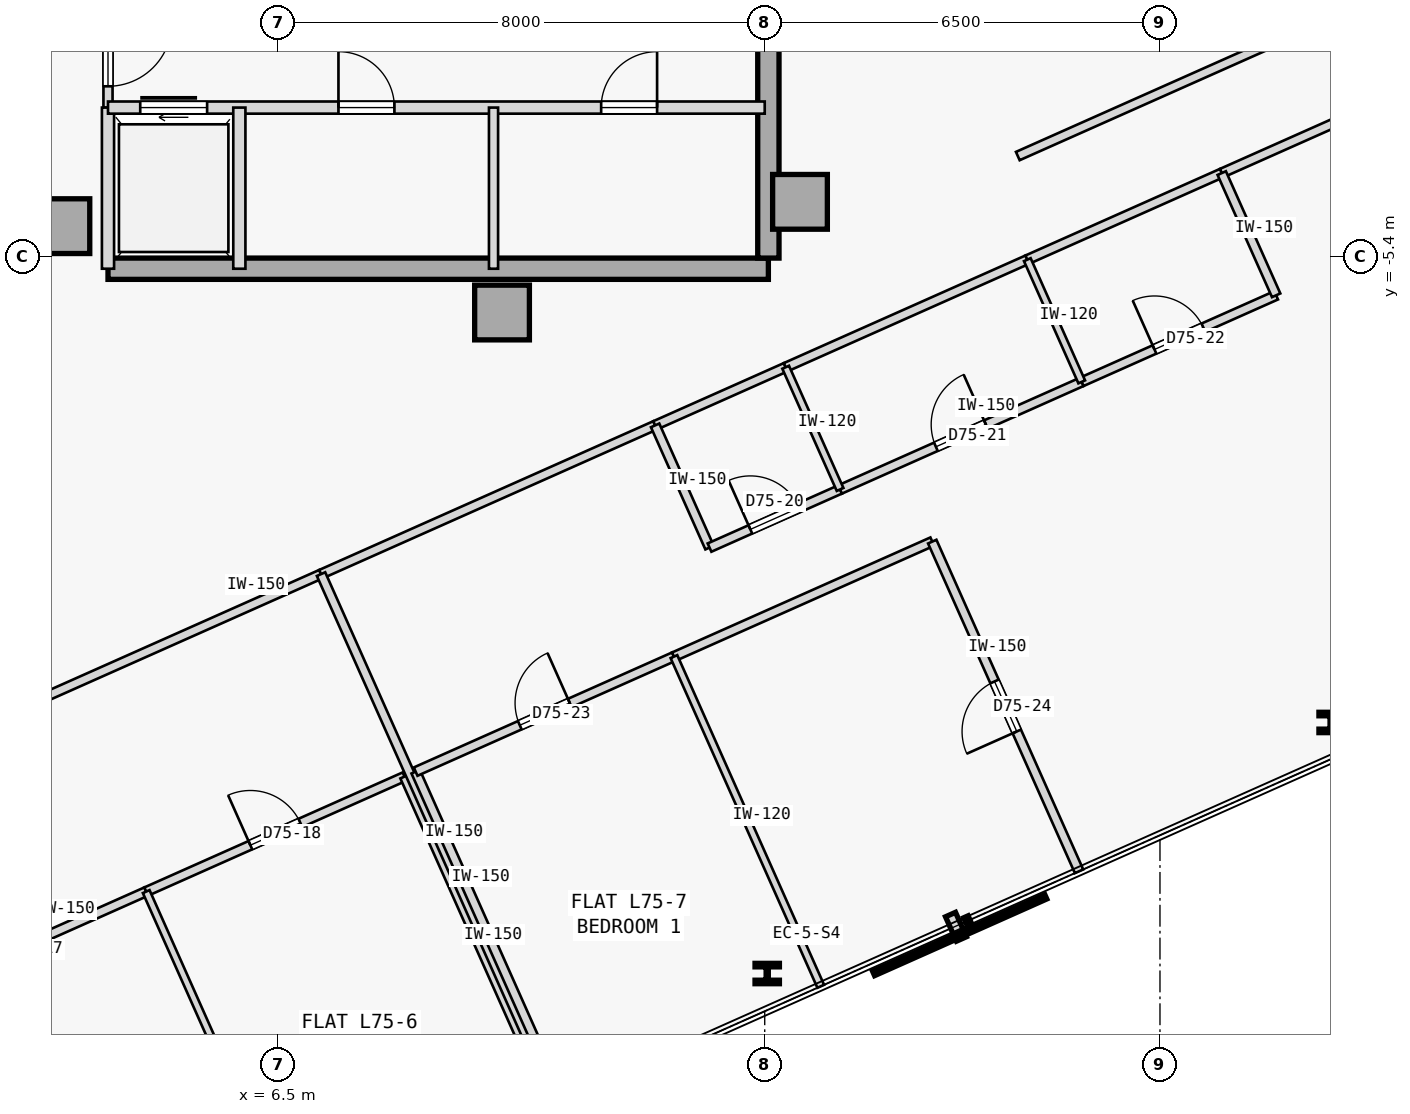
"""IFC4 building model, lengths in metres.
Left out: names, types, materials, properties, quantities, classifications, styles, units other than length and angle.
Written with IfcOpenShell. Run it as: python <this file> out.ifc"""

import sys

from ifc_helpers import new_model, si_unit, direction, frame, frame_2d, origin, origin_2d, place, context, subcontext, project, spatial, rectangle, i_section, extrude, element, fill, save


model = new_model("IFC4")
c1 = context("Model", 3, precision=1e-05, world=origin(), true_north=direction((0.0, 1.0)))
c2 = subcontext(c1, "Body", "Model", "MODEL_VIEW")
j1 = project(units=[si_unit("LENGTHUNIT", "METRE"), si_unit("PLANEANGLEUNIT", "RADIAN")], contexts=[c1])
p1 = place(None, origin())
s1 = spatial("IfcSite", under=j1, at=p1, CompositionType="ELEMENT")
p2 = place(p1, origin())
s2 = spatial("IfcBuilding", under=s1, at=p2, CompositionType="ELEMENT")
p3 = place(p2, frame((0.0, 0.0, 281.9)))
s3 = spatial("IfcBuildingStorey", under=s2, at=p3, CompositionType="ELEMENT", Elevation=281.9)
for number, where, z_axis, x_axis in (
    (1, (15.08, -4.5, 0.0), (0.0, 0.0, 1.0), (1.0, 0.0, 0.0)),
    (2, (10.18, -6.32, 0.0), (0.0, 0.0, 1.0), (1.0, 0.0, 0.0)),
    (3, (2.95, -4.9, 0.0), (0.0, 0.0, 1.0), (1.0, 0.0, 0.0)),
):
    element("IfcColumn", number, at=place(p3, frame(where, z_axis=z_axis, x_axis=x_axis)), inside=s3, PredefinedType="COLUMN", context=c2, shape_type="SweptSolid", body=[
        extrude(rectangle(XDim=0.9, YDim=0.9, at=origin_2d()), origin(), (0.0, 0.0, 1.0), 3.35),
    ])
p4 = place(p3, frame((3.7, -5.6, 0.0), z_axis=(0.0, 0.0, 1.0), x_axis=(1.0, 0.0, 0.0)))
e4 = element("IfcWall", 4, at=p4, inside=s3, PredefinedType="SHEAR", context=c2, shape_type="SweptSolid", body=[
    extrude(rectangle(XDim=10.86, YDim=0.35, at=frame_2d((5.43, 0.0))), origin(), (0.0, 0.0, 1.0), 3.125),
])
p5 = place(p3, frame((14.56, -5.425, 0.0), z_axis=(0.0, 0.0, 1.0), x_axis=(0.0, 1.0, 0.0)))
e5 = element("IfcWall", 5, at=p5, inside=s3, PredefinedType="SHEAR", context=c2, shape_type="SweptSolid", body=[
    extrude(rectangle(XDim=10.85, YDim=0.35, at=frame_2d((5.425, 0.0))), origin(), (0.0, 0.0, 1.0), 3.125),
])
for number, where, z_axis, x_axis in (
    (6, (14.541, -17.19, 0.0), (0.0, 0.0, 1.0), (1.0, 0.0, 0.0)),
    (7, (23.814, -13.062, 0.0), (0.0, 0.0, 1.0), (1.0, 0.0, 0.0)),
):
    element("IfcColumn", number, at=place(p3, frame(where, z_axis=z_axis, x_axis=x_axis)), inside=s3, PredefinedType="COLUMN", context=c2, shape_type="SweptSolid", body=[
        extrude(i_section(OverallWidth=0.401, OverallDepth=0.335, WebThickness=0.036, FlangeThickness=0.058, FilletRadius=0.015, at=origin_2d()), origin(), (0.0, 0.0, 1.0), 3.35),
    ])
p6 = place(p3, frame((3.7, -2.95, 0.0), z_axis=(0.0, 0.0, 1.0), x_axis=(0.0, 1.0, 0.0)))
e8 = element("IfcWall", 8, at=p6, inside=s3, PredefinedType="PARTITIONING", context=c2, shape_type="SweptSolid", body=[
    extrude(rectangle(XDim=1.8, YDim=0.15, at=frame_2d((0.9, 0.0))), origin(), (0.0, 0.0, 1.0), 3.125),
])
p7 = place(p6, frame((0.35, 0.0, 0.0)))
e9 = element("IfcOpeningElement", 9, at=p7, cuts=e8, PredefinedType="OPENING", context=c2, shape_type="SweptSolid", body=[
    extrude(rectangle(XDim=1.05, YDim=2.18, at=frame_2d((0.525, 1.09))), frame((0.0, 0.085, 0.0), z_axis=(0.0, -1.0, 0.0), x_axis=(1.0, 0.0, 0.0)), (0.0, 0.0, 1.0), 0.17),
])
p8 = place(p3, frame((3.7, -5.6, 0.0), z_axis=(0.0, 0.0, 1.0), x_axis=(0.0, 1.0, 0.0)))
e10 = element("IfcWall", 10, at=p8, inside=s3, PredefinedType="STANDARD", context=c2, shape_type="SweptSolid", body=[
    extrude(rectangle(XDim=2.65, YDim=0.2, at=frame_2d((1.325, 0.0))), origin(), (0.0, 0.0, 1.0), 3.125),
])
p9 = place(p3, frame((3.7, -2.95, 0.0), z_axis=(0.0, 0.0, 1.0), x_axis=(1.0, 0.0, 0.0)))
e11 = element("IfcWall", 11, at=p9, inside=s3, PredefinedType="STANDARD", context=c2, shape_type="SweptSolid", body=[
    extrude(rectangle(XDim=10.8, YDim=0.2, at=frame_2d((5.4, 0.0))), origin(), (0.0, 0.0, 1.0), 3.125),
])
p10 = place(p9, frame((0.53, 0.0, 0.0)))
e12 = element("IfcOpeningElement", 12, at=p10, cuts=e11, PredefinedType="OPENING", context=c2, shape_type="SweptSolid", body=[
    extrude(rectangle(XDim=1.1, YDim=2.15, at=frame_2d((0.55, 1.075))), frame((0.0, 0.11, 0.0), z_axis=(0.0, -1.0, 0.0), x_axis=(1.0, 0.0, 0.0)), (0.0, 0.0, 1.0), 0.22),
])
p11 = place(p9, frame((3.79, 0.0, 0.0)))
e13 = element("IfcOpeningElement", 13, at=p11, cuts=e11, PredefinedType="OPENING", context=c2, shape_type="SweptSolid", body=[
    extrude(rectangle(XDim=0.92, YDim=2.15, at=frame_2d((0.46, 1.075))), frame((0.0, 0.11, 0.0), z_axis=(0.0, -1.0, 0.0), x_axis=(1.0, 0.0, 0.0)), (0.0, 0.0, 1.0), 0.22),
])
p12 = place(p9, frame((8.11, 0.0, 0.0)))
e14 = element("IfcOpeningElement", 14, at=p12, cuts=e11, PredefinedType="OPENING", context=c2, shape_type="SweptSolid", body=[
    extrude(rectangle(XDim=0.92, YDim=2.15, at=frame_2d((0.46, 1.075))), frame((0.0, 0.11, 0.0), z_axis=(0.0, -1.0, 0.0), x_axis=(1.0, 0.0, 0.0)), (0.0, 0.0, 1.0), 0.22),
])
p13 = place(p3, frame((5.86, -5.6, 0.0), z_axis=(0.0, 0.0, 1.0), x_axis=(0.0, 1.0, 0.0)))
e15 = element("IfcWall", 15, at=p13, inside=s3, PredefinedType="STANDARD", context=c2, shape_type="SweptSolid", body=[
    extrude(rectangle(XDim=2.65, YDim=0.2, at=frame_2d((1.325, 0.0))), origin(), (0.0, 0.0, 1.0), 3.125),
])
p14 = place(p3, frame((10.04, -5.6, 0.0), z_axis=(0.0, 0.0, 1.0), x_axis=(0.0, 1.0, 0.0)))
e16 = element("IfcWall", 16, at=p14, inside=s3, PredefinedType="PARTITIONING", context=c2, shape_type="SweptSolid", body=[
    extrude(rectangle(XDim=2.65, YDim=0.15, at=frame_2d((1.325, 0.0))), origin(), (0.0, 0.0, 1.0), 3.125),
])
p15 = place(p3, frame((-4.445, -15.808, 0.0), z_axis=(0.0, 0.0, 1.0), x_axis=(0.913546853922, 0.406733506966, 0.0)))
e17 = element("IfcWall", 17, at=p15, inside=s3, PredefinedType="PARTITIONING", context=c2, shape_type="SweptSolid", body=[
    extrude(rectangle(XDim=12.751, YDim=0.15, at=frame_2d((6.375, 0.0))), origin(), (0.0, 0.0, 1.0), 3.125),
])
p16 = place(p15, frame((5.9, 0.0, 0.0)))
e18 = element("IfcOpeningElement", 18, at=p16, cuts=e17, PredefinedType="OPENING", context=c2, shape_type="SweptSolid", body=[
    extrude(rectangle(XDim=0.95, YDim=2.15, at=frame_2d((0.475, 1.075))), frame((0.0, 0.085, 0.0), z_axis=(0.0, -1.0, 0.0), x_axis=(1.0, 0.0, 0.0)), (0.0, 0.0, 1.0), 0.17),
])
p17 = place(p3, frame((7.204, -10.622, 0.0), z_axis=(0.0, 0.0, 1.0), x_axis=(0.913545172627, 0.406737283231, 0.0)))
e19 = element("IfcWall", 19, at=p17, inside=s3, PredefinedType="PARTITIONING", context=c2, shape_type="SweptSolid", body=[
    extrude(rectangle(XDim=6.014, YDim=0.15, at=frame_2d((3.007, 0.0))), origin(), (0.0, 0.0, 1.0), 3.125),
])
p18 = place(p3, frame((22.016, -4.027, 0.0), z_axis=(0.0, 0.0, 1.0), x_axis=(0.913548968583, 0.406728757282, 0.0)))
e20 = element("IfcWall", 20, at=p18, inside=s3, PredefinedType="PARTITIONING", context=c2, shape_type="SweptSolid", body=[
    extrude(rectangle(XDim=11.242, YDim=0.15, at=frame_2d((5.621, 0.0))), origin(), (0.0, 0.0, 1.0), 3.125),
])
p19 = place(p18, frame((5.146, 0.0, 0.0)))
e21 = element("IfcOpeningElement", 21, at=p19, cuts=e20, PredefinedType="OPENING", context=c2, shape_type="SweptSolid", body=[
    extrude(rectangle(XDim=0.95, YDim=2.15, at=frame_2d((0.475, 1.075))), frame((0.0, 0.085, 0.0), z_axis=(0.0, -1.0, 0.0), x_axis=(1.0, 0.0, 0.0)), (0.0, 0.0, 1.0), 0.17),
])
p20 = place(p3, frame((12.698, -8.176, 0.0), z_axis=(0.0, 0.0, 1.0), x_axis=(0.913558622212, 0.406707073682, 0.0)))
e22 = element("IfcWall", 22, at=p20, inside=s3, PredefinedType="PARTITIONING", context=c2, shape_type="SweptSolid", body=[
    extrude(rectangle(XDim=2.35, YDim=0.15, at=frame_2d((1.175, 0.0))), origin(), (0.0, 0.0, 1.0), 3.125),
])
p21 = place(p3, frame((14.844, -7.22, 0.0), z_axis=(0.0, 0.0, 1.0), x_axis=(0.913524337797, 0.406784075711, 0.0)))
e23 = element("IfcWall", 23, at=p21, inside=s3, PredefinedType="PARTITIONING", context=c2, shape_type="SweptSolid", body=[
    extrude(rectangle(XDim=4.35, YDim=0.15, at=frame_2d((2.175, 0.0))), origin(), (0.0, 0.0, 1.0), 3.125),
])
p22 = place(p3, frame((18.818, -5.451, 0.0), z_axis=(0.0, 0.0, 1.0), x_axis=(0.913538066796, 0.406753242783, 0.0)))
e24 = element("IfcWall", 24, at=p22, inside=s3, PredefinedType="PARTITIONING", context=c2, shape_type="SweptSolid", body=[
    extrude(rectangle(XDim=3.5, YDim=0.15, at=frame_2d((1.75, 0.0))), origin(), (0.0, 0.0, 1.0), 3.125),
])
p23 = place(p3, frame((18.662, -3.747, 0.0), z_axis=(0.0, 0.0, 1.0), x_axis=(0.913544622417, 0.406738519018, 0.0)))
e25 = element("IfcWall", 25, at=p23, inside=s3, PredefinedType="PARTITIONING", context=c2, shape_type="SweptSolid", body=[
    extrude(rectangle(XDim=14.192, YDim=0.15, at=frame_2d((7.096, 0.0))), origin(), (0.0, 0.0, 1.0), 3.125),
])
p24 = place(p23, frame((6.636, 0.0, 0.0)))
e26 = element("IfcOpeningElement", 26, at=p24, cuts=e25, PredefinedType="OPENING", context=c2, shape_type="SweptSolid", body=[
    extrude(rectangle(XDim=0.92, YDim=2.15, at=frame_2d((0.46, 1.075))), frame((0.0, 0.085, 0.0), z_axis=(0.0, -1.0, 0.0), x_axis=(1.0, 0.0, 0.0)), (0.0, 0.0, 1.0), 0.17),
])
p25 = place(p3, frame((0.08, -17.734, 0.0), z_axis=(0.0, 0.0, 1.0), x_axis=(0.91354505039, 0.40673755778, 0.0)))
e27 = element("IfcWall", 27, at=p25, inside=s3, PredefinedType="PARTITIONING", context=c2, shape_type="SweptSolid", body=[
    extrude(rectangle(XDim=4.65, YDim=0.15, at=frame_2d((2.325, 0.0))), origin(), (0.0, 0.0, 1.0), 3.125),
])
p26 = place(p25, frame((1.875, 0.0, 0.0)))
e28 = element("IfcOpeningElement", 28, at=p26, cuts=e27, PredefinedType="OPENING", context=c2, shape_type="SweptSolid", body=[
    extrude(rectangle(XDim=0.9, YDim=2.15, at=frame_2d((0.45, 1.075))), frame((0.0, 0.085, 0.0), z_axis=(0.0, -1.0, 0.0), x_axis=(1.0, 0.0, 0.0)), (0.0, 0.0, 1.0), 0.17),
])
p27 = place(p3, frame((4.328, -15.843, 0.0), z_axis=(0.0, 0.0, 1.0), x_axis=(0.91354505039, 0.40673755778, 0.0)))
e29 = element("IfcWall", 29, at=p27, inside=s3, PredefinedType="PARTITIONING", context=c2, shape_type="SweptSolid", body=[
    extrude(rectangle(XDim=4.65, YDim=0.15, at=frame_2d((2.325, 0.0))), origin(), (0.0, 0.0, 1.0), 3.125),
])
p28 = place(p27, frame((1.875, 0.0, 0.0)))
e30 = element("IfcOpeningElement", 30, at=p28, cuts=e29, PredefinedType="OPENING", context=c2, shape_type="SweptSolid", body=[
    extrude(rectangle(XDim=0.9, YDim=2.15, at=frame_2d((0.45, 1.075))), frame((0.0, 0.085, 0.0), z_axis=(0.0, -1.0, 0.0), x_axis=(1.0, 0.0, 0.0)), (0.0, 0.0, 1.0), 0.17),
])
p29 = place(p3, frame((10.99, -19.373, 0.0), z_axis=(0.0, 0.0, 1.0), x_axis=(-0.406749048544, 0.913539934271, 0.0)))
e31 = element("IfcWall", 31, at=p29, inside=s3, PredefinedType="PARTITIONING", context=c2, shape_type="SweptSolid", body=[
    extrude(rectangle(XDim=5.935, YDim=0.15, at=frame_2d((2.968, 0.0))), origin(), (0.0, 0.0, 1.0), 3.125),
])
p30 = place(p3, frame((11.082, -19.333, 0.0), z_axis=(0.0, 0.0, 1.0), x_axis=(-0.406729927653, 0.913548447512, 0.0)))
e32 = element("IfcWall", 32, at=p30, inside=s3, PredefinedType="PARTITIONING", context=c2, shape_type="SweptSolid", body=[
    extrude(rectangle(XDim=9.535, YDim=0.15, at=frame_2d((4.768, 0.0))), origin(), (0.0, 0.0, 1.0), 3.125),
])
p31 = place(p3, frame((6.742, -21.265, 0.0), z_axis=(0.0, 0.0, 1.0), x_axis=(-0.406749048544, 0.913539934271, 0.0)))
e33 = element("IfcWall", 33, at=p31, inside=s3, PredefinedType="PARTITIONING", context=c2, shape_type="SweptSolid", body=[
    extrude(rectangle(XDim=5.935, YDim=0.12, at=frame_2d((2.968, 0.0))), origin(), (0.0, 0.0, 1.0), 3.125),
])
p32 = place(p3, frame((13.592, -10.186, 0.0), z_axis=(0.0, 0.0, 1.0), x_axis=(-0.406725294076, 0.913550510459, 0.0)))
e34 = element("IfcWall", 34, at=p32, inside=s3, PredefinedType="PARTITIONING", context=c2, shape_type="SweptSolid", body=[
    extrude(rectangle(XDim=2.2, YDim=0.15, at=frame_2d((1.1, 0.0))), origin(), (0.0, 0.0, 1.0), 3.125),
])
p33 = place(p3, frame((13.592, -10.186, 0.0), z_axis=(0.0, 0.0, 1.0), x_axis=(0.913558622212, 0.406707073682, 0.0)))
e35 = element("IfcWall", 35, at=p33, inside=s3, PredefinedType="PARTITIONING", context=c2, shape_type="SweptSolid", body=[
    extrude(rectangle(XDim=2.35, YDim=0.15, at=frame_2d((1.175, 0.0))), origin(), (0.0, 0.0, 1.0), 3.125),
])
p34 = place(p33, frame((0.735, 0.0, 0.0)))
e36 = element("IfcOpeningElement", 36, at=p34, cuts=e35, PredefinedType="OPENING", context=c2, shape_type="SweptSolid", body=[
    extrude(rectangle(XDim=0.88, YDim=2.15, at=frame_2d((0.44, 1.075))), frame((0.0, 0.085, 0.0), z_axis=(0.0, -1.0, 0.0), x_axis=(1.0, 0.0, 0.0)), (0.0, 0.0, 1.0), 0.17),
])
p35 = place(p3, frame((15.739, -9.23, 0.0), z_axis=(0.0, 0.0, 1.0), x_axis=(0.913545193015, 0.406737237438, 0.0)))
e37 = element("IfcWall", 37, at=p35, inside=s3, PredefinedType="PARTITIONING", context=c2, shape_type="SweptSolid", body=[
    extrude(rectangle(XDim=4.35, YDim=0.15, at=frame_2d((2.175, 0.0))), origin(), (0.0, 0.0, 1.0), 3.125),
])
p36 = place(p35, frame((1.725, 0.0, 0.0)))
e38 = element("IfcOpeningElement", 38, at=p36, cuts=e37, PredefinedType="OPENING", context=c2, shape_type="SweptSolid", body=[
    extrude(rectangle(XDim=0.9, YDim=2.15, at=frame_2d((0.45, 1.075))), frame((0.0, 0.085, 0.0), z_axis=(0.0, -1.0, 0.0), x_axis=(1.0, 0.0, 0.0)), (0.0, 0.0, 1.0), 0.17),
])
p37 = place(p3, frame((19.713, -7.461, 0.0), z_axis=(0.0, 0.0, 1.0), x_axis=(0.913549606868, 0.406727323635, 0.0)))
e39 = element("IfcWall", 39, at=p37, inside=s3, PredefinedType="PARTITIONING", context=c2, shape_type="SweptSolid", body=[
    extrude(rectangle(XDim=3.5, YDim=0.15, at=frame_2d((1.75, 0.0))), origin(), (0.0, 0.0, 1.0), 3.125),
])
p38 = place(p37, frame((1.31, 0.0, 0.0)))
e40 = element("IfcOpeningElement", 40, at=p38, cuts=e39, PredefinedType="OPENING", context=c2, shape_type="SweptSolid", body=[
    extrude(rectangle(XDim=0.88, YDim=2.15, at=frame_2d((0.44, 1.075))), frame((0.0, 0.085, 0.0), z_axis=(0.0, -1.0, 0.0), x_axis=(1.0, 0.0, 0.0)), (0.0, 0.0, 1.0), 0.17),
])
p39 = place(p3, frame((22.911, -6.037, 0.0), z_axis=(0.0, 0.0, 1.0), x_axis=(-0.40677666873, 0.913527636022, 0.0)))
e41 = element("IfcWall", 41, at=p39, inside=s3, PredefinedType="PARTITIONING", context=c2, shape_type="SweptSolid", body=[
    extrude(rectangle(XDim=2.2, YDim=0.15, at=frame_2d((1.1, 0.0))), origin(), (0.0, 0.0, 1.0), 3.125),
])
p40 = place(p3, frame((11.173, -19.292, 0.0), z_axis=(0.0, 0.0, 1.0), x_axis=(-0.406749048544, 0.913539934271, 0.0)))
e42 = element("IfcWall", 42, at=p40, inside=s3, PredefinedType="PARTITIONING", context=c2, shape_type="SweptSolid", body=[
    extrude(rectangle(XDim=5.935, YDim=0.15, at=frame_2d((2.968, 0.0))), origin(), (0.0, 0.0, 1.0), 3.125),
])
p41 = place(p3, frame((8.759, -13.87, 0.0), z_axis=(0.0, 0.0, 1.0), x_axis=(0.91354505039, 0.40673755778, 0.0)))
e43 = element("IfcWall", 43, at=p41, inside=s3, PredefinedType="PARTITIONING", context=c2, shape_type="SweptSolid", body=[
    extrude(rectangle(XDim=4.65, YDim=0.15, at=frame_2d((2.325, 0.0))), origin(), (0.0, 0.0, 1.0), 3.125),
])
p42 = place(p41, frame((1.875, 0.0, 0.0)))
e44 = element("IfcOpeningElement", 44, at=p42, cuts=e43, PredefinedType="OPENING", context=c2, shape_type="SweptSolid", body=[
    extrude(rectangle(XDim=0.9, YDim=2.15, at=frame_2d((0.45, 1.075))), frame((0.0, 0.085, 0.0), z_axis=(0.0, -1.0, 0.0), x_axis=(1.0, 0.0, 0.0)), (0.0, 0.0, 1.0), 0.17),
])
p43 = place(p3, frame((13.007, -11.979, 0.0), z_axis=(0.0, 0.0, 1.0), x_axis=(0.91354505039, 0.40673755778, 0.0)))
e45 = element("IfcWall", 45, at=p43, inside=s3, PredefinedType="PARTITIONING", context=c2, shape_type="SweptSolid", body=[
    extrude(rectangle(XDim=4.65, YDim=0.15, at=frame_2d((2.325, 0.0))), origin(), (0.0, 0.0, 1.0), 3.125),
])
p44 = place(p3, frame((19.669, -15.51, 0.0), z_axis=(0.0, 0.0, 1.0), x_axis=(-0.406733763825, 0.913546739562, 0.0)))
e46 = element("IfcWall", 46, at=p44, inside=s3, PredefinedType="PARTITIONING", context=c2, shape_type="SweptSolid", body=[
    extrude(rectangle(XDim=5.935, YDim=0.15, at=frame_2d((2.968, 0.0))), origin(), (0.0, 0.0, 1.0), 3.125),
])
p45 = place(p44, frame((2.518, 0.0, 0.0)))
e47 = element("IfcOpeningElement", 47, at=p45, cuts=e46, PredefinedType="OPENING", context=c2, shape_type="SweptSolid", body=[
    extrude(rectangle(XDim=0.9, YDim=2.15, at=frame_2d((0.45, 1.075))), frame((0.0, 0.085, 0.0), z_axis=(0.0, -1.0, 0.0), x_axis=(1.0, 0.0, 0.0)), (0.0, 0.0, 1.0), 0.17),
])
p46 = place(p3, frame((15.739, -9.23, 0.0), z_axis=(0.0, 0.0, 1.0), x_axis=(-0.406725294076, 0.913550510459, 0.0)))
e48 = element("IfcWall", 48, at=p46, inside=s3, PredefinedType="PARTITIONING", context=c2, shape_type="SweptSolid", body=[
    extrude(rectangle(XDim=2.2, YDim=0.12, at=frame_2d((1.1, 0.0))), origin(), (0.0, 0.0, 1.0), 3.125),
])
p47 = place(p3, frame((19.713, -7.461, 0.0), z_axis=(0.0, 0.0, 1.0), x_axis=(-0.406684063321, 0.913568865845, 0.0)))
e49 = element("IfcWall", 49, at=p47, inside=s3, PredefinedType="PARTITIONING", context=c2, shape_type="SweptSolid", body=[
    extrude(rectangle(XDim=2.2, YDim=0.12, at=frame_2d((1.1, 0.0))), origin(), (0.0, 0.0, 1.0), 3.125),
])
p48 = place(p3, frame((15.421, -17.401, 0.0), z_axis=(0.0, 0.0, 1.0), x_axis=(-0.406749048544, 0.913539934271, 0.0)))
e50 = element("IfcWall", 50, at=p48, inside=s3, PredefinedType="PARTITIONING", context=c2, shape_type="SweptSolid", body=[
    extrude(rectangle(XDim=5.935, YDim=0.12, at=frame_2d((2.968, 0.0))), origin(), (0.0, 0.0, 1.0), 3.125),
])
p49 = place(p7, frame((1.05, 0.0, 0.0), z_axis=(0.0, 0.0, 1.0), x_axis=(-1.0, 0.0, 0.0)))
e51 = element("IfcDoor", 51, at=p49, inside=s3, OperationType="SINGLE_SWING_RIGHT", PredefinedType="DOOR", context=c2, shape_type="SweptSolid", body=[
    extrude(rectangle(XDim=1.05, YDim=2.18, at=frame_2d((0.525, 1.09))), frame((0.0, 0.025, 0.0), z_axis=(0.0, -1.0, 0.0), x_axis=(1.0, 0.0, 0.0)), (0.0, 0.0, 1.0), 0.05),
])
fill(e9, e51)
p50 = place(p10, origin())
e52 = element("IfcDoor", 52, at=p50, inside=s3, OperationType="SLIDING_TO_RIGHT", PredefinedType="DOOR", context=c2, shape_type="SweptSolid", body=[
    extrude(rectangle(XDim=1.1, YDim=2.15, at=frame_2d((0.55, 1.075))), frame((0.0, 0.025, 0.0), z_axis=(0.0, -1.0, 0.0), x_axis=(1.0, 0.0, 0.0)), (0.0, 0.0, 1.0), 0.05),
])
fill(e12, e52)
p51 = place(p11, origin())
e53 = element("IfcDoor", 53, at=p51, inside=s3, OperationType="SINGLE_SWING_LEFT", PredefinedType="DOOR", context=c2, shape_type="SweptSolid", body=[
    extrude(rectangle(XDim=0.92, YDim=2.15, at=frame_2d((0.46, 1.075))), frame((0.0, 0.025, 0.0), z_axis=(0.0, -1.0, 0.0), x_axis=(1.0, 0.0, 0.0)), (0.0, 0.0, 1.0), 0.05),
])
fill(e13, e53)
p52 = place(p12, origin())
e54 = element("IfcDoor", 54, at=p52, inside=s3, OperationType="SINGLE_SWING_RIGHT", PredefinedType="DOOR", context=c2, shape_type="SweptSolid", body=[
    extrude(rectangle(XDim=0.92, YDim=2.15, at=frame_2d((0.46, 1.075))), frame((0.0, 0.025, 0.0), z_axis=(0.0, -1.0, 0.0), x_axis=(1.0, 0.0, 0.0)), (0.0, 0.0, 1.0), 0.05),
])
fill(e14, e54)
p53 = place(p28, origin())
e55 = element("IfcDoor", 55, at=p53, inside=s3, OperationType="SINGLE_SWING_LEFT", PredefinedType="DOOR", context=c2, shape_type="SweptSolid", body=[
    extrude(rectangle(XDim=0.9, YDim=2.15, at=frame_2d((0.45, 1.075))), frame((0.0, 0.025, 0.0), z_axis=(0.0, -1.0, 0.0), x_axis=(1.0, 0.0, 0.0)), (0.0, 0.0, 1.0), 0.05),
])
fill(e30, e55)
p54 = place(p34, origin())
e56 = element("IfcDoor", 56, at=p54, inside=s3, OperationType="SINGLE_SWING_LEFT", PredefinedType="DOOR", context=c2, shape_type="SweptSolid", body=[
    extrude(rectangle(XDim=0.88, YDim=2.15, at=frame_2d((0.44, 1.075))), frame((0.0, 0.025, 0.0), z_axis=(0.0, -1.0, 0.0), x_axis=(1.0, 0.0, 0.0)), (0.0, 0.0, 1.0), 0.05),
])
fill(e36, e56)
p55 = place(p36, origin())
e57 = element("IfcDoor", 57, at=p55, inside=s3, OperationType="SINGLE_SWING_RIGHT", PredefinedType="DOOR", context=c2, shape_type="SweptSolid", body=[
    extrude(rectangle(XDim=0.9, YDim=2.15, at=frame_2d((0.45, 1.075))), frame((0.0, 0.025, 0.0), z_axis=(0.0, -1.0, 0.0), x_axis=(1.0, 0.0, 0.0)), (0.0, 0.0, 1.0), 0.05),
])
fill(e38, e57)
p56 = place(p38, origin())
e58 = element("IfcDoor", 58, at=p56, inside=s3, OperationType="SINGLE_SWING_LEFT", PredefinedType="DOOR", context=c2, shape_type="SweptSolid", body=[
    extrude(rectangle(XDim=0.88, YDim=2.15, at=frame_2d((0.44, 1.075))), frame((0.0, 0.025, 0.0), z_axis=(0.0, -1.0, 0.0), x_axis=(1.0, 0.0, 0.0)), (0.0, 0.0, 1.0), 0.05),
])
fill(e40, e58)
p57 = place(p42, origin())
e59 = element("IfcDoor", 59, at=p57, inside=s3, OperationType="SINGLE_SWING_RIGHT", PredefinedType="DOOR", context=c2, shape_type="SweptSolid", body=[
    extrude(rectangle(XDim=0.9, YDim=2.15, at=frame_2d((0.45, 1.075))), frame((0.0, 0.025, 0.0), z_axis=(0.0, -1.0, 0.0), x_axis=(1.0, 0.0, 0.0)), (0.0, 0.0, 1.0), 0.05),
])
fill(e44, e59)
p58 = place(p45, origin())
e60 = element("IfcDoor", 60, at=p58, inside=s3, OperationType="SINGLE_SWING_LEFT", PredefinedType="DOOR", context=c2, shape_type="SweptSolid", body=[
    extrude(rectangle(XDim=0.9, YDim=2.15, at=frame_2d((0.45, 1.075))), frame((0.0, 0.025, 0.0), z_axis=(0.0, -1.0, 0.0), x_axis=(1.0, 0.0, 0.0)), (0.0, 0.0, 1.0), 0.05),
])
fill(e47, e60)
save(model, sys.argv[1])
